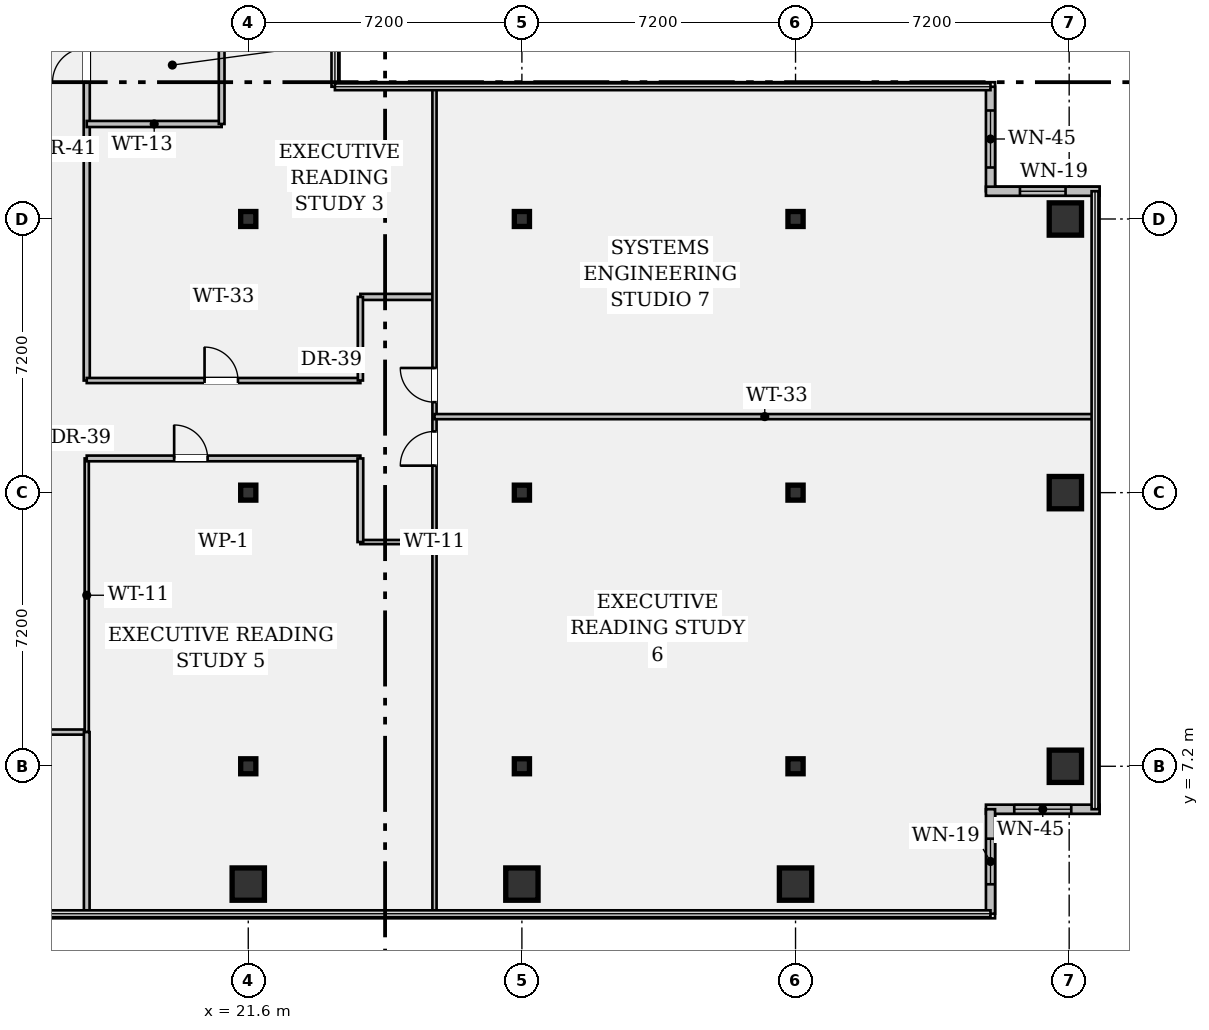
"""IFC4 building model, lengths in metres.
Left out: names, types, materials, properties, quantities, classifications, styles, units other than length and angle.
Written with IfcOpenShell. Run it as: python <this file> out.ifc"""

import sys

from ifc_helpers import new_model, si_unit, direction, frame, frame_2d, origin, origin_2d, place, context, subcontext, project, spatial, rectangle, hollow_rectangle, i_section, extrude, element, fill, save


model = new_model("IFC4")
c1 = context("Model", 3, precision=1e-05, world=origin(), true_north=direction((0.0, 1.0)))
c2 = subcontext(c1, "Body", "Model", "MODEL_VIEW")
j1 = project(units=[si_unit("LENGTHUNIT", "METRE"), si_unit("PLANEANGLEUNIT", "RADIAN")], contexts=[c1])
p1 = place(None, origin())
s1 = spatial("IfcSite", under=j1, at=p1, CompositionType="ELEMENT")
p2 = place(p1, origin())
s2 = spatial("IfcBuilding", under=s1, at=p2, CompositionType="ELEMENT")
p3 = place(p2, frame((0.0, 0.0, 183.75)))
s3 = spatial("IfcBuildingStorey", under=s2, at=p3, CompositionType="ELEMENT", Elevation=183.75)
p4 = place(p3, frame((21.6, 4.1, 0.0), z_axis=(0.0, 0.0, 1.0), x_axis=(1.0, 0.0, 0.0)))
e1 = element("IfcColumn", 1, at=p4, inside=s3, PredefinedType="COLUMN", context=c2, shape_type="SweptSolid", body=[
    extrude(hollow_rectangle(XDim=0.85, YDim=0.85, WallThickness=0.05, at=origin_2d()), origin(), (0.0, 0.0, 1.0), 3.24),
])
for number, where, z_axis, x_axis in (
    (2, (21.6, 7.2, 0.0), (0.0, 0.0, 1.0), (1.0, 0.0, 0.0)),
    (3, (21.6, 14.4, 0.0), (0.0, 0.0, 1.0), (1.0, 0.0, 0.0)),
    (4, (21.6, 21.6, 0.0), (0.0, 0.0, 1.0), (1.0, 0.0, 0.0)),
):
    element("IfcColumn", number, at=place(p3, frame(where, z_axis=z_axis, x_axis=x_axis)), inside=s3, PredefinedType="COLUMN", context=c2, shape_type="SweptSolid", body=[
        extrude(i_section(OverallWidth=0.399, OverallDepth=0.394, WebThickness=0.023, FlangeThickness=0.037, FilletRadius=0.018, at=origin_2d()), origin(), (0.0, 0.0, 1.0), 3.24),
    ])
p5 = place(p3, frame((28.8, 4.1, 0.0), z_axis=(0.0, 0.0, 1.0), x_axis=(1.0, 0.0, 0.0)))
e5 = element("IfcColumn", 5, at=p5, inside=s3, PredefinedType="COLUMN", context=c2, shape_type="SweptSolid", body=[
    extrude(hollow_rectangle(XDim=0.85, YDim=0.85, WallThickness=0.05, at=origin_2d()), origin(), (0.0, 0.0, 1.0), 3.24),
])
for number, where, z_axis, x_axis in (
    (6, (28.8, 7.2, 0.0), (0.0, 0.0, 1.0), (1.0, 0.0, 0.0)),
    (7, (28.8, 14.4, 0.0), (0.0, 0.0, 1.0), (1.0, 0.0, 0.0)),
    (8, (28.8, 21.6, 0.0), (0.0, 0.0, 1.0), (1.0, 0.0, 0.0)),
):
    element("IfcColumn", number, at=place(p3, frame(where, z_axis=z_axis, x_axis=x_axis)), inside=s3, PredefinedType="COLUMN", context=c2, shape_type="SweptSolid", body=[
        extrude(i_section(OverallWidth=0.399, OverallDepth=0.394, WebThickness=0.023, FlangeThickness=0.037, FilletRadius=0.018, at=origin_2d()), origin(), (0.0, 0.0, 1.0), 3.24),
    ])
p6 = place(p3, frame((36.0, 4.1, 0.0), z_axis=(0.0, 0.0, 1.0), x_axis=(1.0, 0.0, 0.0)))
e9 = element("IfcColumn", 9, at=p6, inside=s3, PredefinedType="COLUMN", context=c2, shape_type="SweptSolid", body=[
    extrude(hollow_rectangle(XDim=0.85, YDim=0.85, WallThickness=0.05, at=origin_2d()), origin(), (0.0, 0.0, 1.0), 3.24),
])
for number, where, z_axis, x_axis in (
    (10, (36.0, 7.2, 0.0), (0.0, 0.0, 1.0), (1.0, 0.0, 0.0)),
    (11, (36.0, 14.4, 0.0), (0.0, 0.0, 1.0), (1.0, 0.0, 0.0)),
    (12, (36.0, 21.6, 0.0), (0.0, 0.0, 1.0), (1.0, 0.0, 0.0)),
):
    element("IfcColumn", number, at=place(p3, frame(where, z_axis=z_axis, x_axis=x_axis)), inside=s3, PredefinedType="COLUMN", context=c2, shape_type="SweptSolid", body=[
        extrude(i_section(OverallWidth=0.399, OverallDepth=0.394, WebThickness=0.023, FlangeThickness=0.037, FilletRadius=0.018, at=origin_2d()), origin(), (0.0, 0.0, 1.0), 3.24),
    ])
for number, where, z_axis, x_axis in (
    (13, (43.1, 7.2, 0.0), (0.0, 0.0, 1.0), (1.0, 0.0, 0.0)),
    (14, (43.1, 14.4, 0.0), (0.0, 0.0, 1.0), (1.0, 0.0, 0.0)),
    (15, (43.1, 21.6, 0.0), (0.0, 0.0, 1.0), (1.0, 0.0, 0.0)),
):
    element("IfcColumn", number, at=place(p3, frame(where, z_axis=z_axis, x_axis=x_axis)), inside=s3, PredefinedType="COLUMN", context=c2, shape_type="SweptSolid", body=[
        extrude(hollow_rectangle(XDim=0.85, YDim=0.85, WallThickness=0.05, at=origin_2d()), origin(), (0.0, 0.0, 1.0), 3.24),
    ])
p7 = place(p3, frame((41.13, 25.08, 0.0), z_axis=(0.0, 0.0, 1.0), x_axis=(0.0, -1.0, 0.0)))
e16 = element("IfcWall", 16, at=p7, inside=s3, PredefinedType="STANDARD", context=c2, shape_type="SweptSolid", body=[
    extrude(rectangle(XDim=2.75, YDim=0.24, at=frame_2d((1.375, 0.0))), origin(), (0.0, 0.0, 1.0), 3.24),
])
p8 = place(p7, frame((0.625, 0.0, 0.95)))
e17 = element("IfcOpeningElement", 17, at=p8, cuts=e16, PredefinedType="OPENING", context=c2, shape_type="SweptSolid", body=[
    extrude(rectangle(XDim=1.5, YDim=1.8, at=frame_2d((0.75, 0.9))), frame((0.0, 0.132, 0.0), z_axis=(0.0, -1.0, 0.0), x_axis=(1.0, 0.0, 0.0)), (0.0, 0.0, 1.0), 0.264),
])
p9 = place(p3, frame((41.01, 22.33, 0.0), z_axis=(0.0, 0.0, 1.0), x_axis=(1.0, 0.0, 0.0)))
e18 = element("IfcWall", 18, at=p9, inside=s3, PredefinedType="STANDARD", context=c2, shape_type="SweptSolid", body=[
    extrude(rectangle(XDim=2.99, YDim=0.24, at=frame_2d((1.495, 0.0))), origin(), (0.0, 0.0, 1.0), 3.24),
])
p10 = place(p9, frame((0.895, 0.0, 0.95)))
e19 = element("IfcOpeningElement", 19, at=p10, cuts=e18, PredefinedType="OPENING", context=c2, shape_type="SweptSolid", body=[
    extrude(rectangle(XDim=1.2, YDim=1.8, at=frame_2d((0.6, 0.9))), frame((0.0, 0.132, 0.0), z_axis=(0.0, -1.0, 0.0), x_axis=(1.0, 0.0, 0.0)), (0.0, 0.0, 1.0), 0.264),
])
p11 = place(p3, frame((44.0, 6.07, 0.0), z_axis=(0.0, 0.0, 1.0), x_axis=(-1.0, 0.0, 0.0)))
e20 = element("IfcWall", 20, at=p11, inside=s3, PredefinedType="STANDARD", context=c2, shape_type="SweptSolid", body=[
    extrude(rectangle(XDim=2.99, YDim=0.24, at=frame_2d((1.495, 0.0))), origin(), (0.0, 0.0, 1.0), 3.24),
])
p12 = place(p11, frame((0.745, 0.0, 0.95)))
e21 = element("IfcOpeningElement", 21, at=p12, cuts=e20, PredefinedType="OPENING", context=c2, shape_type="SweptSolid", body=[
    extrude(rectangle(XDim=1.5, YDim=1.8, at=frame_2d((0.75, 0.9))), frame((0.0, 0.132, 0.0), z_axis=(0.0, -1.0, 0.0), x_axis=(1.0, 0.0, 0.0)), (0.0, 0.0, 1.0), 0.264),
])
p13 = place(p3, frame((41.13, 6.07, 0.0), z_axis=(0.0, 0.0, 1.0), x_axis=(0.0, -1.0, 0.0)))
e22 = element("IfcWall", 22, at=p13, inside=s3, PredefinedType="STANDARD", context=c2, shape_type="SweptSolid", body=[
    extrude(rectangle(XDim=2.75, YDim=0.24, at=frame_2d((1.375, 0.0))), origin(), (0.0, 0.0, 1.0), 3.24),
])
p14 = place(p13, frame((0.775, 0.0, 0.95)))
e23 = element("IfcOpeningElement", 23, at=p14, cuts=e22, PredefinedType="OPENING", context=c2, shape_type="SweptSolid", body=[
    extrude(rectangle(XDim=1.2, YDim=1.8, at=frame_2d((0.6, 0.9))), frame((0.0, 0.132, 0.0), z_axis=(0.0, -1.0, 0.0), x_axis=(1.0, 0.0, 0.0)), (0.0, 0.0, 1.0), 0.264),
])
p15 = place(p3, frame((14.4, 8.1, 0.0), z_axis=(0.0, 0.0, 1.0), x_axis=(1.0, 0.0, 0.0)))
e24 = element("IfcWall", 24, at=p15, inside=s3, PredefinedType="PARTITIONING", context=c2, shape_type="SweptSolid", body=[
    extrude(rectangle(XDim=2.95, YDim=0.135, at=frame_2d((1.475, 0.0))), origin(), (0.0, 0.0, 1.0), 2.808),
])
p16 = place(p15, frame((0.95, 0.0, 0.0)))
e25 = element("IfcOpeningElement", 25, at=p16, cuts=e24, PredefinedType="OPENING", context=c2, shape_type="SweptSolid", body=[
    extrude(rectangle(XDim=0.88, YDim=2.15, at=frame_2d((0.44, 1.075))), frame((0.0, 0.08, 0.0), z_axis=(0.0, -1.0, 0.0), x_axis=(1.0, 0.0, 0.0)), (0.0, 0.0, 1.0), 0.159),
])
p17 = place(p3, frame((17.35, 8.1, 0.0), z_axis=(0.0, 0.0, 1.0), x_axis=(0.0, 1.0, 0.0)))
e26 = element("IfcWall", 26, at=p17, inside=s3, PredefinedType="PARTITIONING", context=c2, shape_type="SweptSolid", body=[
    extrude(rectangle(XDim=7.2, YDim=0.11, at=frame_2d((3.6, 0.0))), origin(), (0.0, 0.0, 1.0), 2.603),
])
p18 = place(p3, frame((17.35, 17.35, 0.0), z_axis=(0.0, 0.0, 1.0), x_axis=(0.0, 1.0, 0.0)))
e27 = element("IfcWall", 27, at=p18, inside=s3, PredefinedType="PARTITIONING", context=c2, shape_type="SweptSolid", body=[
    extrude(rectangle(XDim=18.55, YDim=0.16, at=frame_2d((9.275, 0.0))), origin(), (0.0, 0.0, 1.0), 2.603),
])
p19 = place(p18, frame((7.85, 0.0, 0.0)))
e28 = element("IfcOpeningElement", 28, at=p19, cuts=e27, PredefinedType="OPENING", context=c2, shape_type="SweptSolid", body=[
    extrude(rectangle(XDim=0.9, YDim=2.15, at=frame_2d((0.45, 1.075))), frame((0.0, 0.092, 0.0), z_axis=(0.0, -1.0, 0.0), x_axis=(1.0, 0.0, 0.0)), (0.0, 0.0, 1.0), 0.184),
])
p20 = place(p18, frame((10.75, 0.0, 0.0)))
e29 = element("IfcOpeningElement", 29, at=p20, cuts=e27, PredefinedType="OPENING", context=c2, shape_type="SweptSolid", body=[
    extrude(rectangle(XDim=0.9, YDim=2.15, at=frame_2d((0.45, 1.075))), frame((0.0, 0.092, 0.0), z_axis=(0.0, -1.0, 0.0), x_axis=(1.0, 0.0, 0.0)), (0.0, 0.0, 1.0), 0.184),
])
p21 = place(p18, frame((13.65, 0.0, 0.0)))
e30 = element("IfcOpeningElement", 30, at=p21, cuts=e27, PredefinedType="OPENING", context=c2, shape_type="SweptSolid", body=[
    extrude(rectangle(XDim=0.9, YDim=2.15, at=frame_2d((0.45, 1.075))), frame((0.0, 0.092, 0.0), z_axis=(0.0, -1.0, 0.0), x_axis=(1.0, 0.0, 0.0)), (0.0, 0.0, 1.0), 0.184),
])
p22 = place(p18, frame((16.55, 0.0, 0.0)))
e31 = element("IfcOpeningElement", 31, at=p22, cuts=e27, PredefinedType="OPENING", context=c2, shape_type="SweptSolid", body=[
    extrude(rectangle(XDim=0.9, YDim=2.15, at=frame_2d((0.45, 1.075))), frame((0.0, 0.092, 0.0), z_axis=(0.0, -1.0, 0.0), x_axis=(1.0, 0.0, 0.0)), (0.0, 0.0, 1.0), 0.184),
])
p23 = place(p3, frame((17.35, 15.3, 0.0), z_axis=(0.0, 0.0, 1.0), x_axis=(1.0, 0.0, 0.0)))
e32 = element("IfcWall", 32, at=p23, inside=s3, PredefinedType="PARTITIONING", context=c2, shape_type="SweptSolid", body=[
    extrude(rectangle(XDim=7.2, YDim=0.15, at=frame_2d((3.6, 0.0))), origin(), (0.0, 0.0, 1.0), 2.603),
])
p24 = place(p23, frame((2.3, 0.0, 0.0)))
e33 = element("IfcOpeningElement", 33, at=p24, cuts=e32, PredefinedType="OPENING", context=c2, shape_type="SweptSolid", body=[
    extrude(rectangle(XDim=0.88, YDim=2.15, at=frame_2d((0.44, 1.075))), frame((0.0, 0.087, 0.0), z_axis=(0.0, -1.0, 0.0), x_axis=(1.0, 0.0, 0.0)), (0.0, 0.0, 1.0), 0.174),
])
p25 = place(p3, frame((17.35, 17.35, 0.0), z_axis=(0.0, 0.0, 1.0), x_axis=(1.0, 0.0, 0.0)))
e34 = element("IfcWall", 34, at=p25, inside=s3, PredefinedType="PARTITIONING", context=c2, shape_type="SweptSolid", body=[
    extrude(rectangle(XDim=7.2, YDim=0.135, at=frame_2d((3.6, 0.0))), origin(), (0.0, 0.0, 1.0), 2.603),
])
p26 = place(p25, frame((3.1, 0.0, 0.0)))
e35 = element("IfcOpeningElement", 35, at=p26, cuts=e34, PredefinedType="OPENING", context=c2, shape_type="SweptSolid", body=[
    extrude(rectangle(XDim=0.88, YDim=2.15, at=frame_2d((0.44, 1.075))), frame((0.0, 0.08, 0.0), z_axis=(0.0, -1.0, 0.0), x_axis=(1.0, 0.0, 0.0)), (0.0, 0.0, 1.0), 0.159),
])
p27 = place(p3, frame((24.55, 13.1, 0.0), z_axis=(0.0, 0.0, 1.0), x_axis=(1.0, 0.0, 0.0)))
e36 = element("IfcWall", 36, at=p27, inside=s3, PredefinedType="PARTITIONING", context=c2, shape_type="SweptSolid", body=[
    extrude(rectangle(XDim=1.95, YDim=0.11, at=frame_2d((0.975, 0.0))), origin(), (0.0, 0.0, 1.0), 2.808),
])
p28 = place(p3, frame((24.55, 19.55, 0.0), z_axis=(0.0, 0.0, 1.0), x_axis=(1.0, 0.0, 0.0)))
e37 = element("IfcWall", 37, at=p28, inside=s3, PredefinedType="PARTITIONING", context=c2, shape_type="SweptSolid", body=[
    extrude(rectangle(XDim=1.95, YDim=0.16, at=frame_2d((0.975, 0.0))), origin(), (0.0, 0.0, 1.0), 2.808),
])
p29 = place(p3, frame((24.55, 13.1, 0.0), z_axis=(0.0, 0.0, 1.0), x_axis=(0.0, 1.0, 0.0)))
e38 = element("IfcWall", 38, at=p29, inside=s3, PredefinedType="PARTITIONING", context=c2, shape_type="SweptSolid", body=[
    extrude(rectangle(XDim=2.2, YDim=0.15, at=frame_2d((1.1, 0.0))), origin(), (0.0, 0.0, 1.0), 2.603),
])
p30 = place(p3, frame((24.55, 17.35, 0.0), z_axis=(0.0, 0.0, 1.0), x_axis=(0.0, 1.0, 0.0)))
e39 = element("IfcWall", 39, at=p30, inside=s3, PredefinedType="PARTITIONING", context=c2, shape_type="SweptSolid", body=[
    extrude(rectangle(XDim=2.2, YDim=0.135, at=frame_2d((1.1, 0.0))), origin(), (0.0, 0.0, 1.0), 3.24),
])
p31 = place(p3, frame((26.5, 3.32, 0.0), z_axis=(0.0, 0.0, 1.0), x_axis=(0.0, 1.0, 0.0)))
e40 = element("IfcWall", 40, at=p31, inside=s3, PredefinedType="PARTITIONING", context=c2, shape_type="SweptSolid", body=[
    extrude(rectangle(XDim=21.76, YDim=0.11, at=frame_2d((10.88, 0.0))), origin(), (0.0, 0.0, 1.0), 2.603),
])
p32 = place(p31, frame((11.79, 0.0, 0.0)))
e41 = element("IfcOpeningElement", 41, at=p32, cuts=e40, PredefinedType="OPENING", context=c2, shape_type="SweptSolid", body=[
    extrude(rectangle(XDim=0.9, YDim=2.15, at=frame_2d((0.45, 1.075))), frame((0.0, 0.067, 0.0), z_axis=(0.0, -1.0, 0.0), x_axis=(1.0, 0.0, 0.0)), (0.0, 0.0, 1.0), 0.134),
])
p33 = place(p31, frame((13.46, 0.0, 0.0)))
e42 = element("IfcOpeningElement", 42, at=p33, cuts=e40, PredefinedType="OPENING", context=c2, shape_type="SweptSolid", body=[
    extrude(rectangle(XDim=0.9, YDim=2.15, at=frame_2d((0.45, 1.075))), frame((0.0, 0.067, 0.0), z_axis=(0.0, -1.0, 0.0), x_axis=(1.0, 0.0, 0.0)), (0.0, 0.0, 1.0), 0.134),
])
p34 = place(p3, frame((17.35, 24.1, 0.0), z_axis=(0.0, 0.0, 1.0), x_axis=(1.0, 0.0, 0.0)))
e43 = element("IfcWall", 43, at=p34, inside=s3, PredefinedType="PARTITIONING", context=c2, shape_type="SweptSolid", body=[
    extrude(rectangle(XDim=3.55, YDim=0.16, at=frame_2d((1.775, 0.0))), origin(), (0.0, 0.0, 1.0), 2.808),
])
p35 = place(p3, frame((20.9, 24.1, 0.0), z_axis=(0.0, 0.0, 1.0), x_axis=(0.0, 1.0, 0.0)))
e44 = element("IfcWall", 44, at=p35, inside=s3, PredefinedType="PARTITIONING", context=c2, shape_type="SweptSolid", body=[
    extrude(rectangle(XDim=11.8, YDim=0.15, at=frame_2d((5.9, 0.0))), origin(), (0.0, 0.0, 1.0), 2.603),
])
p36 = place(p3, frame((17.35, 3.32, 0.0), z_axis=(0.0, 0.0, 1.0), x_axis=(0.0, 1.0, 0.0)))
e45 = element("IfcWall", 45, at=p36, inside=s3, PredefinedType="PARTITIONING", context=c2, shape_type="SweptSolid", body=[
    extrude(rectangle(XDim=4.78, YDim=0.15, at=frame_2d((2.39, 0.0))), origin(), (0.0, 0.0, 1.0), 2.603),
])
p37 = place(p3, frame((26.5, 16.4, 0.0), z_axis=(0.0, 0.0, 1.0), x_axis=(1.0, 0.0, 0.0)))
e46 = element("IfcWall", 46, at=p37, inside=s3, PredefinedType="PARTITIONING", context=c2, shape_type="SweptSolid", body=[
    extrude(rectangle(XDim=17.38, YDim=0.135, at=frame_2d((8.69, 0.0))), origin(), (0.0, 0.0, 1.0), 2.603),
])
p38 = place(p8, origin())
e47 = element("IfcWindow", 47, at=p38, inside=s3, PartitioningType="SINGLE_PANEL", PredefinedType="WINDOW", context=c2, shape_type="SweptSolid", body=[
    extrude(rectangle(XDim=1.5, YDim=1.8, at=frame_2d((0.75, 0.9))), frame((0.0, 0.03, 0.0), z_axis=(0.0, -1.0, 0.0), x_axis=(1.0, 0.0, 0.0)), (0.0, 0.0, 1.0), 0.06),
])
fill(e17, e47)
p39 = place(p10, origin())
e48 = element("IfcWindow", 48, at=p39, inside=s3, PartitioningType="SINGLE_PANEL", PredefinedType="WINDOW", context=c2, shape_type="SweptSolid", body=[
    extrude(rectangle(XDim=1.2, YDim=1.8, at=frame_2d((0.6, 0.9))), frame((0.0, 0.03, 0.0), z_axis=(0.0, -1.0, 0.0), x_axis=(1.0, 0.0, 0.0)), (0.0, 0.0, 1.0), 0.06),
])
fill(e19, e48)
p40 = place(p12, origin())
e49 = element("IfcWindow", 49, at=p40, inside=s3, PartitioningType="SINGLE_PANEL", PredefinedType="WINDOW", context=c2, shape_type="SweptSolid", body=[
    extrude(rectangle(XDim=1.5, YDim=1.8, at=frame_2d((0.75, 0.9))), frame((0.0, 0.03, 0.0), z_axis=(0.0, -1.0, 0.0), x_axis=(1.0, 0.0, 0.0)), (0.0, 0.0, 1.0), 0.06),
])
fill(e21, e49)
p41 = place(p14, origin())
e50 = element("IfcWindow", 50, at=p41, inside=s3, PartitioningType="SINGLE_PANEL", PredefinedType="WINDOW", context=c2, shape_type="SweptSolid", body=[
    extrude(rectangle(XDim=1.2, YDim=1.8, at=frame_2d((0.6, 0.9))), frame((0.0, 0.03, 0.0), z_axis=(0.0, -1.0, 0.0), x_axis=(1.0, 0.0, 0.0)), (0.0, 0.0, 1.0), 0.06),
])
fill(e23, e50)
p42 = place(p19, origin())
e51 = element("IfcDoor", 51, at=p42, inside=s3, OperationType="SINGLE_SWING_LEFT", PredefinedType="DOOR", context=c2, shape_type="SweptSolid", body=[
    extrude(rectangle(XDim=0.9, YDim=2.15, at=frame_2d((0.45, 1.075))), frame((0.0, 0.025, 0.0), z_axis=(0.0, -1.0, 0.0), x_axis=(1.0, 0.0, 0.0)), (0.0, 0.0, 1.0), 0.05),
])
fill(e28, e51)
p43 = place(p26, origin())
e52 = element("IfcDoor", 52, at=p43, inside=s3, OperationType="SINGLE_SWING_LEFT", PredefinedType="DOOR", context=c2, shape_type="SweptSolid", body=[
    extrude(rectangle(XDim=0.88, YDim=2.15, at=frame_2d((0.44, 1.075))), frame((0.0, 0.025, 0.0), z_axis=(0.0, -1.0, 0.0), x_axis=(1.0, 0.0, 0.0)), (0.0, 0.0, 1.0), 0.05),
])
fill(e35, e52)
p44 = place(p24, origin())
e53 = element("IfcDoor", 53, at=p44, inside=s3, OperationType="SINGLE_SWING_LEFT", PredefinedType="DOOR", context=c2, shape_type="SweptSolid", body=[
    extrude(rectangle(XDim=0.88, YDim=2.15, at=frame_2d((0.44, 1.075))), frame((0.0, 0.025, 0.0), z_axis=(0.0, -1.0, 0.0), x_axis=(1.0, 0.0, 0.0)), (0.0, 0.0, 1.0), 0.05),
])
fill(e33, e53)
p45 = place(p32, origin())
e54 = element("IfcDoor", 54, at=p45, inside=s3, OperationType="SINGLE_SWING_LEFT", PredefinedType="DOOR", context=c2, shape_type="SweptSolid", body=[
    extrude(rectangle(XDim=0.9, YDim=2.15, at=frame_2d((0.45, 1.075))), frame((0.0, 0.025, 0.0), z_axis=(0.0, -1.0, 0.0), x_axis=(1.0, 0.0, 0.0)), (0.0, 0.0, 1.0), 0.05),
])
fill(e41, e54)
p46 = place(p33, origin())
e55 = element("IfcDoor", 55, at=p46, inside=s3, OperationType="SINGLE_SWING_RIGHT", PredefinedType="DOOR", context=c2, shape_type="SweptSolid", body=[
    extrude(rectangle(XDim=0.9, YDim=2.15, at=frame_2d((0.45, 1.075))), frame((0.0, 0.025, 0.0), z_axis=(0.0, -1.0, 0.0), x_axis=(1.0, 0.0, 0.0)), (0.0, 0.0, 1.0), 0.05),
])
fill(e42, e55)
save(model, sys.argv[1])
